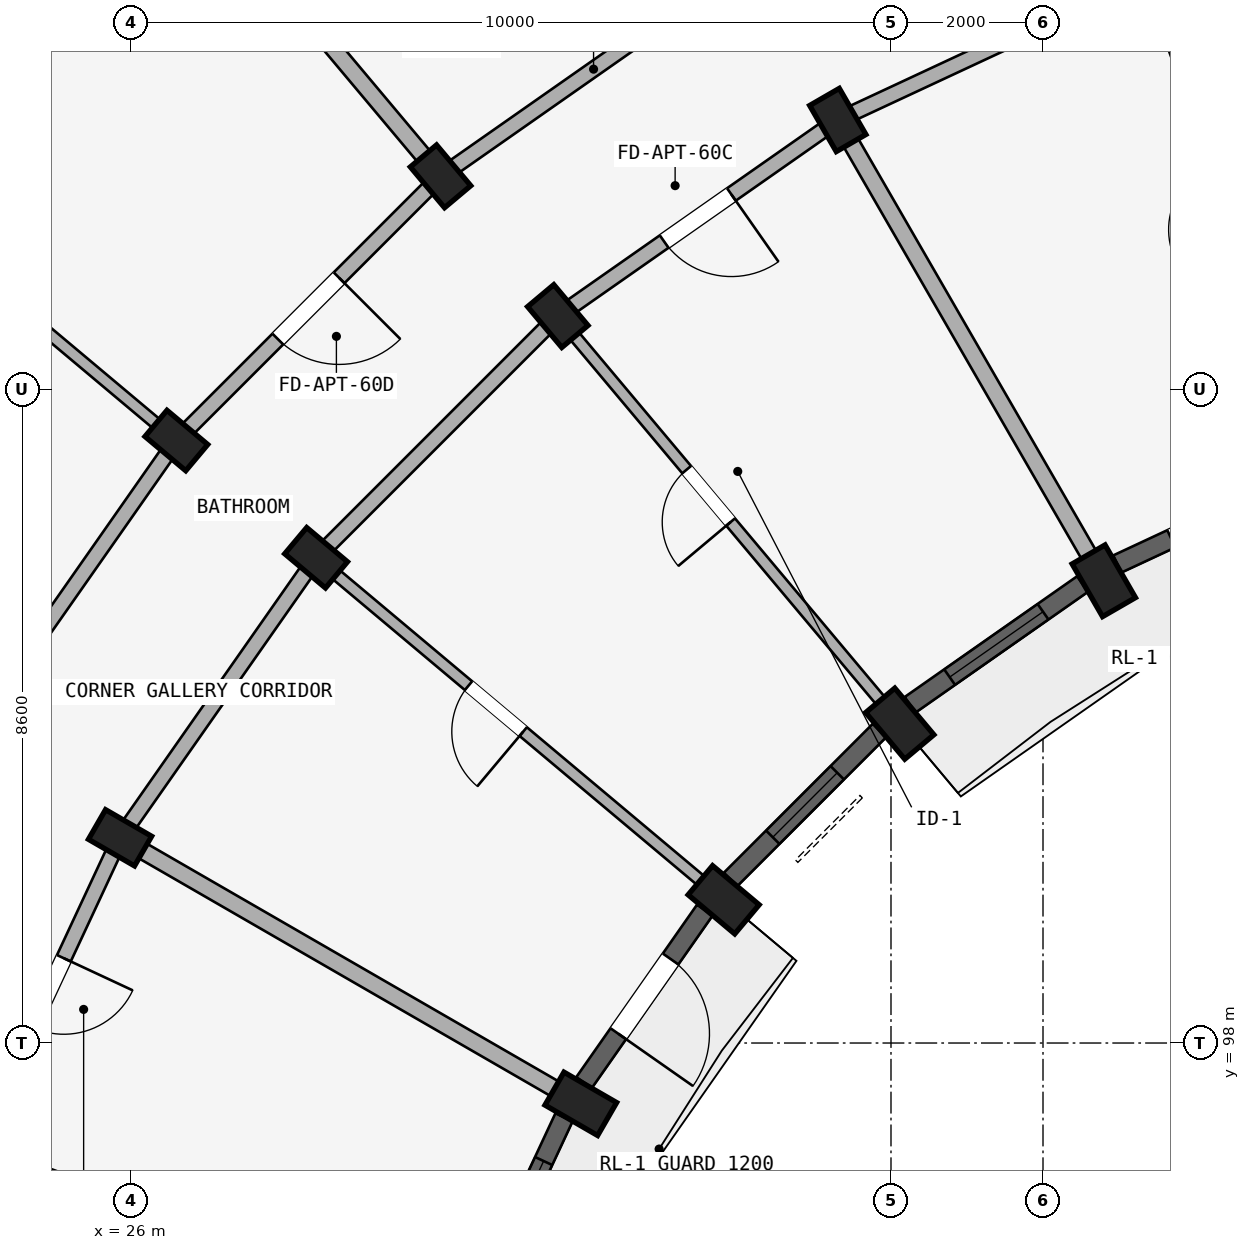
"""IFC4 building model, lengths in metres.
Left out: names, types, materials, properties, quantities, classifications, styles, units other than length and angle.
Written with IfcOpenShell. Run it as: python <this file> out.ifc"""

import sys

from ifc_helpers import new_model, si_unit, direction, frame, frame_2d, origin, origin_2d, place, context, subcontext, project, spatial, rectangle, extrude, element, fill, save


model = new_model("IFC4")
c1 = context("Model", 3, precision=1e-05, world=origin(), true_north=direction((0.0, 1.0)))
c2 = subcontext(c1, "Body", "Model", "MODEL_VIEW")
j1 = project(units=[si_unit("LENGTHUNIT", "METRE"), si_unit("PLANEANGLEUNIT", "RADIAN")], contexts=[c1])
p1 = place(None, origin())
s1 = spatial("IfcSite", under=j1, at=p1, CompositionType="ELEMENT")
p2 = place(p1, origin())
s2 = spatial("IfcBuilding", under=s1, at=p2, CompositionType="ELEMENT")
p3 = place(p2, frame((0.0, 0.0, 24.45)))
s3 = spatial("IfcBuildingStorey", under=s2, at=p3, CompositionType="ELEMENT", Elevation=24.45)
p4 = place(p3, frame((38.8, 104.081, 0.0), z_axis=(0.0, 0.0, 1.0), x_axis=(0.866025403784, 0.5, 0.0)))
e1 = element("IfcColumn", 1, at=p4, inside=s3, PredefinedType="COLUMN", context=c2, shape_type="SweptSolid", body=[
    extrude(rectangle(XDim=0.5, YDim=0.8, at=origin_2d()), origin(), (0.0, 0.0, 1.0), 2.93),
])
p5 = place(p3, frame((35.3, 110.144, 0.0), z_axis=(0.0, 0.0, 1.0), x_axis=(0.866025403784, 0.5, 0.0)))
e2 = element("IfcColumn", 2, at=p5, inside=s3, PredefinedType="COLUMN", context=c2, shape_type="SweptSolid", body=[
    extrude(rectangle(XDim=0.45, YDim=0.7, at=origin_2d()), origin(), (0.0, 0.0, 1.0), 2.93),
])
p6 = place(p3, frame((36.115, 102.202, 0.0), z_axis=(0.0, 0.0, 1.0), x_axis=(0.766044443119, 0.642787609687, 0.0)))
e3 = element("IfcColumn", 3, at=p6, inside=s3, PredefinedType="COLUMN", context=c2, shape_type="SweptSolid", body=[
    extrude(rectangle(XDim=0.5, YDim=0.8, at=origin_2d()), origin(), (0.0, 0.0, 1.0), 2.93),
])
for number, where, z_axis, x_axis in (
    (4, (31.616, 107.564, 0.0), (0.0, 0.0, 1.0), (0.766, 0.643, 0.0)),
    (5, (30.073, 109.402, 0.0), (0.0, 0.0, 1.0), (0.766, 0.643, 0.0)),
):
    element("IfcColumn", number, at=place(p3, frame(where, z_axis=z_axis, x_axis=x_axis)), inside=s3, PredefinedType="COLUMN", context=c2, shape_type="SweptSolid", body=[
        extrude(rectangle(XDim=0.45, YDim=0.7, at=origin_2d()), origin(), (0.0, 0.0, 1.0), 2.93),
    ])
p7 = place(p3, frame((33.798, 99.885, 0.0), z_axis=(0.0, 0.0, 1.0), x_axis=(0.642787609687, 0.766044443119, 0.0)))
e6 = element("IfcColumn", 6, at=p7, inside=s3, PredefinedType="COLUMN", context=c2, shape_type="SweptSolid", body=[
    extrude(rectangle(XDim=0.5, YDim=0.8, at=origin_2d()), origin(), (0.0, 0.0, 1.0), 2.93),
])
for number, where, z_axis, x_axis in (
    (7, (28.436, 104.384, 0.0), (0.0, 0.0, 1.0), (0.643, 0.766, 0.0)),
    (8, (26.598, 105.927, 0.0), (0.0, 0.0, 1.0), (0.643, 0.766, 0.0)),
):
    element("IfcColumn", number, at=place(p3, frame(where, z_axis=z_axis, x_axis=x_axis)), inside=s3, PredefinedType="COLUMN", context=c2, shape_type="SweptSolid", body=[
        extrude(rectangle(XDim=0.45, YDim=0.7, at=origin_2d()), origin(), (0.0, 0.0, 1.0), 2.93),
    ])
p8 = place(p3, frame((31.919, 97.2, 0.0), z_axis=(0.0, 0.0, 1.0), x_axis=(0.5, 0.866025403784, 0.0)))
e9 = element("IfcColumn", 9, at=p8, inside=s3, PredefinedType="COLUMN", context=c2, shape_type="SweptSolid", body=[
    extrude(rectangle(XDim=0.5, YDim=0.8, at=origin_2d()), origin(), (0.0, 0.0, 1.0), 2.93),
])
p9 = place(p3, frame((25.856, 100.7, 0.0), z_axis=(0.0, 0.0, 1.0), x_axis=(0.5, 0.866025403784, 0.0)))
e10 = element("IfcColumn", 10, at=p9, inside=s3, PredefinedType="COLUMN", context=c2, shape_type="SweptSolid", body=[
    extrude(rectangle(XDim=0.45, YDim=0.7, at=origin_2d()), origin(), (0.0, 0.0, 1.0), 2.93),
])
p10 = place(p3, frame((39.376, 112.044, 0.0), z_axis=(0.0, 0.0, 1.0), x_axis=(-0.906307919131, -0.422617978463, 0.0)))
e11 = element("IfcWall", 11, at=p10, inside=s3, PredefinedType="STANDARD", context=c2, shape_type="SweptSolid", body=[
    extrude(rectangle(XDim=4.497, YDim=0.2, at=frame_2d((2.249, 0.0))), origin(), (0.0, 0.0, 1.0), 2.372),
])
p11 = place(p3, frame((35.3, 110.144, 0.0), z_axis=(0.0, 0.0, 1.0), x_axis=(-0.819155404658, -0.573571637217, 0.0)))
e12 = element("IfcWall", 12, at=p11, inside=s3, PredefinedType="STANDARD", context=c2, shape_type="SweptSolid", body=[
    extrude(rectangle(XDim=4.497, YDim=0.2, at=frame_2d((2.249, 0.0))), origin(), (0.0, 0.0, 1.0), 2.372),
])
p12 = place(p11, frame((1.709, 0.0, 0.0)))
e13 = element("IfcOpeningElement", 13, at=p12, cuts=e12, PredefinedType="OPENING", context=c2, shape_type="SweptSolid", body=[
    extrude(rectangle(XDim=1.08, YDim=2.15, at=frame_2d((0.54, 1.075))), frame((0.0, 0.11, 0.0), z_axis=(0.0, -1.0, 0.0), x_axis=(1.0, 0.0, 0.0)), (0.0, 0.0, 1.0), 0.22),
])
p13 = place(p3, frame((34.1, 112.222, 0.0), z_axis=(0.0, 0.0, 1.0), x_axis=(-0.819140911474, -0.573592335331, 0.0)))
e14 = element("IfcWall", 14, at=p13, inside=s3, PredefinedType="STANDARD", context=c2, shape_type="SweptSolid", body=[
    extrude(rectangle(XDim=4.916, YDim=0.2, at=frame_2d((2.458, 0.0))), origin(), (0.0, 0.0, 1.0), 2.372),
])
p14 = place(p3, frame((31.616, 107.564, 0.0), z_axis=(0.0, 0.0, 1.0), x_axis=(-0.707106781187, -0.707106781187, 0.0)))
e15 = element("IfcWall", 15, at=p14, inside=s3, PredefinedType="STANDARD", context=c2, shape_type="SweptSolid", body=[
    extrude(rectangle(XDim=4.497, YDim=0.2, at=frame_2d((2.249, 0.0))), origin(), (0.0, 0.0, 1.0), 2.372),
])
p15 = place(p3, frame((30.073, 109.402, 0.0), z_axis=(0.0, 0.0, 1.0), x_axis=(-0.707106781187, -0.707106781187, 0.0)))
e16 = element("IfcWall", 16, at=p15, inside=s3, PredefinedType="STANDARD", context=c2, shape_type="SweptSolid", body=[
    extrude(rectangle(XDim=4.916, YDim=0.2, at=frame_2d((2.458, 0.0))), origin(), (0.0, 0.0, 1.0), 2.372),
])
p16 = place(p15, frame((1.888, 0.0, 0.0)))
e17 = element("IfcOpeningElement", 17, at=p16, cuts=e16, PredefinedType="OPENING", context=c2, shape_type="SweptSolid", body=[
    extrude(rectangle(XDim=1.14, YDim=2.15, at=frame_2d((0.57, 1.075))), frame((0.0, 0.11, 0.0), z_axis=(0.0, -1.0, 0.0), x_axis=(1.0, 0.0, 0.0)), (0.0, 0.0, 1.0), 0.22),
])
p17 = place(p3, frame((28.436, 104.384, 0.0), z_axis=(0.0, 0.0, 1.0), x_axis=(-0.573571637217, -0.819155404658, 0.0)))
e18 = element("IfcWall", 18, at=p17, inside=s3, PredefinedType="STANDARD", context=c2, shape_type="SweptSolid", body=[
    extrude(rectangle(XDim=4.497, YDim=0.2, at=frame_2d((2.249, 0.0))), origin(), (0.0, 0.0, 1.0), 2.372),
])
p18 = place(p3, frame((26.598, 105.927, 0.0), z_axis=(0.0, 0.0, 1.0), x_axis=(-0.573592335331, -0.819140911474, 0.0)))
e19 = element("IfcWall", 19, at=p18, inside=s3, PredefinedType="STANDARD", context=c2, shape_type="SweptSolid", body=[
    extrude(rectangle(XDim=4.916, YDim=0.2, at=frame_2d((2.458, 0.0))), origin(), (0.0, 0.0, 1.0), 2.372),
])
p19 = place(p3, frame((25.856, 100.7, 0.0), z_axis=(0.0, 0.0, 1.0), x_axis=(-0.422617978463, -0.906307919131, 0.0)))
e20 = element("IfcWall", 20, at=p19, inside=s3, PredefinedType="STANDARD", context=c2, shape_type="SweptSolid", body=[
    extrude(rectangle(XDim=4.497, YDim=0.2, at=frame_2d((2.249, 0.0))), origin(), (0.0, 0.0, 1.0), 2.372),
])
p20 = place(p19, frame((1.749, 0.0, 0.0)))
e21 = element("IfcOpeningElement", 21, at=p20, cuts=e20, PredefinedType="OPENING", context=c2, shape_type="SweptSolid", body=[
    extrude(rectangle(XDim=1.0, YDim=2.15, at=frame_2d((0.5, 1.075))), frame((0.0, 0.11, 0.0), z_axis=(0.0, -1.0, 0.0), x_axis=(1.0, 0.0, 0.0)), (0.0, 0.0, 1.0), 0.22),
])
p21 = place(p3, frame((41.702, 105.654, 0.0), z_axis=(0.0, 0.0, 1.0), x_axis=(-0.342010221662, 0.939696231917, 0.0)))
e22 = element("IfcWall", 22, at=p21, inside=s3, PredefinedType="PARTITIONING", context=c2, shape_type="SweptSolid", body=[
    extrude(rectangle(XDim=6.75, YDim=0.15, at=frame_2d((3.375, 0.0))), origin(), (0.0, 0.0, 1.0), 2.372),
])
p22 = place(p21, frame((3.242, 0.0, 0.0)))
e23 = element("IfcOpeningElement", 23, at=p22, cuts=e22, PredefinedType="OPENING", context=c2, shape_type="SweptSolid", body=[
    extrude(rectangle(XDim=0.94, YDim=2.1, at=frame_2d((0.47, 1.05))), frame((0.0, 0.085, 0.0), z_axis=(0.0, -1.0, 0.0), x_axis=(1.0, 0.0, 0.0)), (0.0, 0.0, 1.0), 0.17),
])
p23 = place(p3, frame((38.7, 104.254, 0.0), z_axis=(0.0, 0.0, 1.0), x_axis=(-0.499997969693, 0.866026575979, 0.0)))
e24 = element("IfcWall", 24, at=p23, inside=s3, PredefinedType="STANDARD", context=c2, shape_type="SweptSolid", body=[
    extrude(rectangle(XDim=6.75, YDim=0.22, at=frame_2d((3.375, 0.0))), origin(), (0.0, 0.0, 1.0), 2.372),
])
p24 = place(p3, frame((35.987, 102.355, 0.0), z_axis=(0.0, 0.0, 1.0), x_axis=(-0.642784846501, 0.766046761698, 0.0)))
e25 = element("IfcWall", 25, at=p24, inside=s3, PredefinedType="PARTITIONING", context=c2, shape_type="SweptSolid", body=[
    extrude(rectangle(XDim=6.75, YDim=0.15, at=frame_2d((3.375, 0.0))), origin(), (0.0, 0.0, 1.0), 2.372),
])
p25 = place(p24, frame((3.262, 0.0, 0.0)))
e26 = element("IfcOpeningElement", 26, at=p25, cuts=e25, PredefinedType="OPENING", context=c2, shape_type="SweptSolid", body=[
    extrude(rectangle(XDim=0.9, YDim=2.1, at=frame_2d((0.45, 1.05))), frame((0.0, 0.085, 0.0), z_axis=(0.0, -1.0, 0.0), x_axis=(1.0, 0.0, 0.0)), (0.0, 0.0, 1.0), 0.17),
])
p26 = place(p3, frame((30.009, 109.479, 0.0), z_axis=(0.0, 0.0, 1.0), x_axis=(-0.642784757967, 0.766046835987, 0.0)))
e27 = element("IfcWall", 27, at=p26, inside=s3, PredefinedType="STANDARD", context=c2, shape_type="SweptSolid", body=[
    extrude(rectangle(XDim=17.42, YDim=0.22, at=frame_2d((8.71, 0.0))), origin(), (0.0, 0.0, 1.0), 2.372),
])
p27 = place(p3, frame((33.645, 100.013, 0.0), z_axis=(0.0, 0.0, 1.0), x_axis=(-0.766046761698, 0.642784846501, 0.0)))
e28 = element("IfcWall", 28, at=p27, inside=s3, PredefinedType="PARTITIONING", context=c2, shape_type="SweptSolid", body=[
    extrude(rectangle(XDim=6.75, YDim=0.15, at=frame_2d((3.375, 0.0))), origin(), (0.0, 0.0, 1.0), 2.372),
])
p28 = place(p27, frame((3.242, 0.0, 0.0)))
e29 = element("IfcOpeningElement", 29, at=p28, cuts=e28, PredefinedType="OPENING", context=c2, shape_type="SweptSolid", body=[
    extrude(rectangle(XDim=0.94, YDim=2.1, at=frame_2d((0.47, 1.05))), frame((0.0, 0.085, 0.0), z_axis=(0.0, -1.0, 0.0), x_axis=(1.0, 0.0, 0.0)), (0.0, 0.0, 1.0), 0.17),
])
p29 = place(p3, frame((26.521, 105.991, 0.0), z_axis=(0.0, 0.0, 1.0), x_axis=(-0.766046835987, 0.642784757967, 0.0)))
e30 = element("IfcWall", 30, at=p29, inside=s3, PredefinedType="PARTITIONING", context=c2, shape_type="SweptSolid", body=[
    extrude(rectangle(XDim=17.42, YDim=0.15, at=frame_2d((8.71, 0.0))), origin(), (0.0, 0.0, 1.0), 2.372),
])
p30 = place(p29, frame((7.5, 0.0, 0.0)))
e31 = element("IfcOpeningElement", 31, at=p30, cuts=e30, PredefinedType="OPENING", context=c2, shape_type="SweptSolid", body=[
    extrude(rectangle(XDim=0.8, YDim=2.1, at=frame_2d((0.4, 1.05))), frame((0.0, 0.085, 0.0), z_axis=(0.0, -1.0, 0.0), x_axis=(1.0, 0.0, 0.0)), (0.0, 0.0, 1.0), 0.17),
])
p31 = place(p3, frame((31.746, 97.3, 0.0), z_axis=(0.0, 0.0, 1.0), x_axis=(-0.866026575979, 0.499997969693, 0.0)))
e32 = element("IfcWall", 32, at=p31, inside=s3, PredefinedType="STANDARD", context=c2, shape_type="SweptSolid", body=[
    extrude(rectangle(XDim=6.75, YDim=0.22, at=frame_2d((3.375, 0.0))), origin(), (0.0, 0.0, 1.0), 2.372),
])
p32 = place(p3, frame((30.346, 94.298, 0.0), z_axis=(0.0, 0.0, 1.0), x_axis=(-0.939696231917, 0.342010221662, 0.0)))
e33 = element("IfcWall", 33, at=p32, inside=s3, PredefinedType="PARTITIONING", context=c2, shape_type="SweptSolid", body=[
    extrude(rectangle(XDim=6.75, YDim=0.15, at=frame_2d((3.375, 0.0))), origin(), (0.0, 0.0, 1.0), 2.372),
])
p33 = place(p32, frame((3.262, 0.0, 0.0)))
e34 = element("IfcOpeningElement", 34, at=p33, cuts=e33, PredefinedType="OPENING", context=c2, shape_type="SweptSolid", body=[
    extrude(rectangle(XDim=0.9, YDim=2.1, at=frame_2d((0.45, 1.05))), frame((0.0, 0.085, 0.0), z_axis=(0.0, -1.0, 0.0), x_axis=(1.0, 0.0, 0.0)), (0.0, 0.0, 1.0), 0.17),
])
p34 = place(p3, frame((41.487, 105.472, 0.0), z_axis=(0.0, 0.0, 1.0), x_axis=(-0.906293449611, -0.422649007088, 0.0)))
e35 = element("IfcWall", 35, at=p34, inside=s3, PredefinedType="STANDARD", context=c2, shape_type="SweptSolid", body=[
    extrude(rectangle(XDim=2.77, YDim=0.25, at=frame_2d((1.385, 0.0))), origin(), (0.0, 0.0, 1.0), 2.422),
])
p35 = place(p34, frame((0.785, 0.0, 0.0)))
e36 = element("IfcOpeningElement", 36, at=p35, cuts=e35, PredefinedType="OPENING", context=c2, shape_type="SweptSolid", body=[
    extrude(rectangle(XDim=1.2, YDim=2.15, at=frame_2d((0.6, 1.075))), frame((0.0, 0.135, 0.0), z_axis=(0.0, -1.0, 0.0), x_axis=(1.0, 0.0, 0.0)), (0.0, 0.0, 1.0), 0.27),
])
p36 = place(p3, frame((38.521, 104.038, 0.0), z_axis=(0.0, 0.0, 1.0), x_axis=(-0.819111815273, -0.573633885053, 0.0)))
e37 = element("IfcWall", 37, at=p36, inside=s3, PredefinedType="STANDARD", context=c2, shape_type="SweptSolid", body=[
    extrude(rectangle(XDim=2.77, YDim=0.25, at=frame_2d((1.385, 0.0))), origin(), (0.0, 0.0, 1.0), 2.422),
])
p37 = place(p36, frame((0.635, 0.0, 0.572)))
e38 = element("IfcOpeningElement", 38, at=p37, cuts=e37, PredefinedType="OPENING", context=c2, shape_type="SweptSolid", body=[
    extrude(rectangle(XDim=1.5, YDim=1.65, at=frame_2d((0.75, 0.825))), frame((0.0, 0.135, 0.0), z_axis=(0.0, -1.0, 0.0), x_axis=(1.0, 0.0, 0.0)), (0.0, 0.0, 1.0), 0.27),
])
p38 = place(p3, frame((35.848, 102.111, 0.0), z_axis=(0.0, 0.0, 1.0), x_axis=(-0.707106781187, -0.707106781187, 0.0)))
e39 = element("IfcWall", 39, at=p38, inside=s3, PredefinedType="STANDARD", context=c2, shape_type="SweptSolid", body=[
    extrude(rectangle(XDim=2.77, YDim=0.25, at=frame_2d((1.385, 0.0))), origin(), (0.0, 0.0, 1.0), 2.422),
])
p39 = place(p38, frame((0.785, 0.0, 0.722)))
e40 = element("IfcOpeningElement", 40, at=p39, cuts=e39, PredefinedType="OPENING", context=c2, shape_type="SweptSolid", body=[
    extrude(rectangle(XDim=1.2, YDim=1.5, at=frame_2d((0.6, 0.75))), frame((0.0, 0.135, 0.0), z_axis=(0.0, -1.0, 0.0), x_axis=(1.0, 0.0, 0.0)), (0.0, 0.0, 1.0), 0.27),
])
p40 = place(p3, frame((33.551, 99.748, 0.0), z_axis=(0.0, 0.0, 1.0), x_axis=(-0.573633885053, -0.819111815273, 0.0)))
e41 = element("IfcWall", 41, at=p40, inside=s3, PredefinedType="STANDARD", context=c2, shape_type="SweptSolid", body=[
    extrude(rectangle(XDim=2.77, YDim=0.25, at=frame_2d((1.385, 0.0))), origin(), (0.0, 0.0, 1.0), 2.422),
])
p41 = place(p40, frame((0.785, 0.0, 0.0)))
e42 = element("IfcOpeningElement", 42, at=p41, cuts=e41, PredefinedType="OPENING", context=c2, shape_type="SweptSolid", body=[
    extrude(rectangle(XDim=1.2, YDim=2.15, at=frame_2d((0.6, 1.075))), frame((0.0, 0.135, 0.0), z_axis=(0.0, -1.0, 0.0), x_axis=(1.0, 0.0, 0.0)), (0.0, 0.0, 1.0), 0.27),
])
p42 = place(p3, frame((31.698, 97.023, 0.0), z_axis=(0.0, 0.0, 1.0), x_axis=(-0.422649007088, -0.906293449611, 0.0)))
e43 = element("IfcWall", 43, at=p42, inside=s3, PredefinedType="STANDARD", context=c2, shape_type="SweptSolid", body=[
    extrude(rectangle(XDim=2.77, YDim=0.25, at=frame_2d((1.385, 0.0))), origin(), (0.0, 0.0, 1.0), 2.422),
])
p43 = place(p42, frame((0.635, 0.0, 0.572)))
e44 = element("IfcOpeningElement", 44, at=p43, cuts=e43, PredefinedType="OPENING", context=c2, shape_type="SweptSolid", body=[
    extrude(rectangle(XDim=1.5, YDim=1.65, at=frame_2d((0.75, 0.825))), frame((0.0, 0.135, 0.0), z_axis=(0.0, -1.0, 0.0), x_axis=(1.0, 0.0, 0.0)), (0.0, 0.0, 1.0), 0.27),
])
p44 = place(p37, origin())
e45 = element("IfcWindow", 45, at=p44, inside=s3, PartitioningType="DOUBLE_PANEL_VERTICAL", PredefinedType="WINDOW", context=c2, shape_type="SweptSolid", body=[
    extrude(rectangle(XDim=1.5, YDim=1.65, at=frame_2d((0.75, 0.825))), frame((0.0, 0.03, 0.0), z_axis=(0.0, -1.0, 0.0), x_axis=(1.0, 0.0, 0.0)), (0.0, 0.0, 1.0), 0.06),
])
fill(e38, e45)
p45 = place(p39, origin())
e46 = element("IfcWindow", 46, at=p45, inside=s3, PartitioningType="SINGLE_PANEL", PredefinedType="WINDOW", context=c2, shape_type="SweptSolid", body=[
    extrude(rectangle(XDim=1.2, YDim=1.5, at=frame_2d((0.6, 0.75))), frame((0.0, 0.03, 0.0), z_axis=(0.0, -1.0, 0.0), x_axis=(1.0, 0.0, 0.0)), (0.0, 0.0, 1.0), 0.06),
])
fill(e40, e46)
p46 = place(p43, origin())
e47 = element("IfcWindow", 47, at=p46, inside=s3, PartitioningType="DOUBLE_PANEL_VERTICAL", PredefinedType="WINDOW", context=c2, shape_type="SweptSolid", body=[
    extrude(rectangle(XDim=1.5, YDim=1.65, at=frame_2d((0.75, 0.825))), frame((0.0, 0.03, 0.0), z_axis=(0.0, -1.0, 0.0), x_axis=(1.0, 0.0, 0.0)), (0.0, 0.0, 1.0), 0.06),
])
fill(e44, e47)
p47 = place(p25, origin())
e48 = element("IfcDoor", 48, at=p47, inside=s3, OperationType="SINGLE_SWING_LEFT", PredefinedType="DOOR", context=c2, shape_type="SweptSolid", body=[
    extrude(rectangle(XDim=0.9, YDim=2.1, at=frame_2d((0.45, 1.05))), frame((0.0, 0.025, 0.0), z_axis=(0.0, -1.0, 0.0), x_axis=(1.0, 0.0, 0.0)), (0.0, 0.0, 1.0), 0.05),
])
fill(e26, e48)
p48 = place(p28, frame((0.94, 0.0, 0.0), z_axis=(0.0, 0.0, 1.0), x_axis=(-1.0, 0.0, 0.0)))
e49 = element("IfcDoor", 49, at=p48, inside=s3, OperationType="SINGLE_SWING_RIGHT", PredefinedType="DOOR", context=c2, shape_type="SweptSolid", body=[
    extrude(rectangle(XDim=0.94, YDim=2.1, at=frame_2d((0.47, 1.05))), frame((0.0, 0.025, 0.0), z_axis=(0.0, -1.0, 0.0), x_axis=(1.0, 0.0, 0.0)), (0.0, 0.0, 1.0), 0.05),
])
fill(e29, e49)
p49 = place(p16, frame((1.14, 0.0, 0.0), z_axis=(0.0, 0.0, 1.0), x_axis=(-1.0, 0.0, 0.0)))
e50 = element("IfcDoor", 50, at=p49, inside=s3, OperationType="SINGLE_SWING_RIGHT", PredefinedType="DOOR", context=c2, shape_type="SweptSolid", body=[
    extrude(rectangle(XDim=1.14, YDim=2.15, at=frame_2d((0.57, 1.075))), frame((0.0, 0.025, 0.0), z_axis=(0.0, -1.0, 0.0), x_axis=(1.0, 0.0, 0.0)), (0.0, 0.0, 1.0), 0.05),
])
fill(e17, e50)
p50 = place(p12, origin())
e51 = element("IfcDoor", 51, at=p50, inside=s3, OperationType="SINGLE_SWING_LEFT", PredefinedType="DOOR", context=c2, shape_type="SweptSolid", body=[
    extrude(rectangle(XDim=1.08, YDim=2.15, at=frame_2d((0.54, 1.075))), frame((0.0, 0.025, 0.0), z_axis=(0.0, -1.0, 0.0), x_axis=(1.0, 0.0, 0.0)), (0.0, 0.0, 1.0), 0.05),
])
fill(e13, e51)
p51 = place(p20, frame((1.0, 0.0, 0.0), z_axis=(0.0, 0.0, 1.0), x_axis=(-1.0, 0.0, 0.0)))
e52 = element("IfcDoor", 52, at=p51, inside=s3, OperationType="SINGLE_SWING_RIGHT", PredefinedType="DOOR", context=c2, shape_type="SweptSolid", body=[
    extrude(rectangle(XDim=1.0, YDim=2.15, at=frame_2d((0.5, 1.075))), frame((0.0, 0.025, 0.0), z_axis=(0.0, -1.0, 0.0), x_axis=(1.0, 0.0, 0.0)), (0.0, 0.0, 1.0), 0.05),
])
fill(e21, e52)
p52 = place(p41, origin())
e53 = element("IfcDoor", 53, at=p52, inside=s3, OperationType="SINGLE_SWING_RIGHT", PredefinedType="DOOR", context=c2, shape_type="SweptSolid", body=[
    extrude(rectangle(XDim=1.2, YDim=2.15, at=frame_2d((0.6, 1.075))), frame((0.0, 0.025, 0.0), z_axis=(0.0, -1.0, 0.0), x_axis=(1.0, 0.0, 0.0)), (0.0, 0.0, 1.0), 0.05),
])
fill(e42, e53)
save(model, sys.argv[1])
